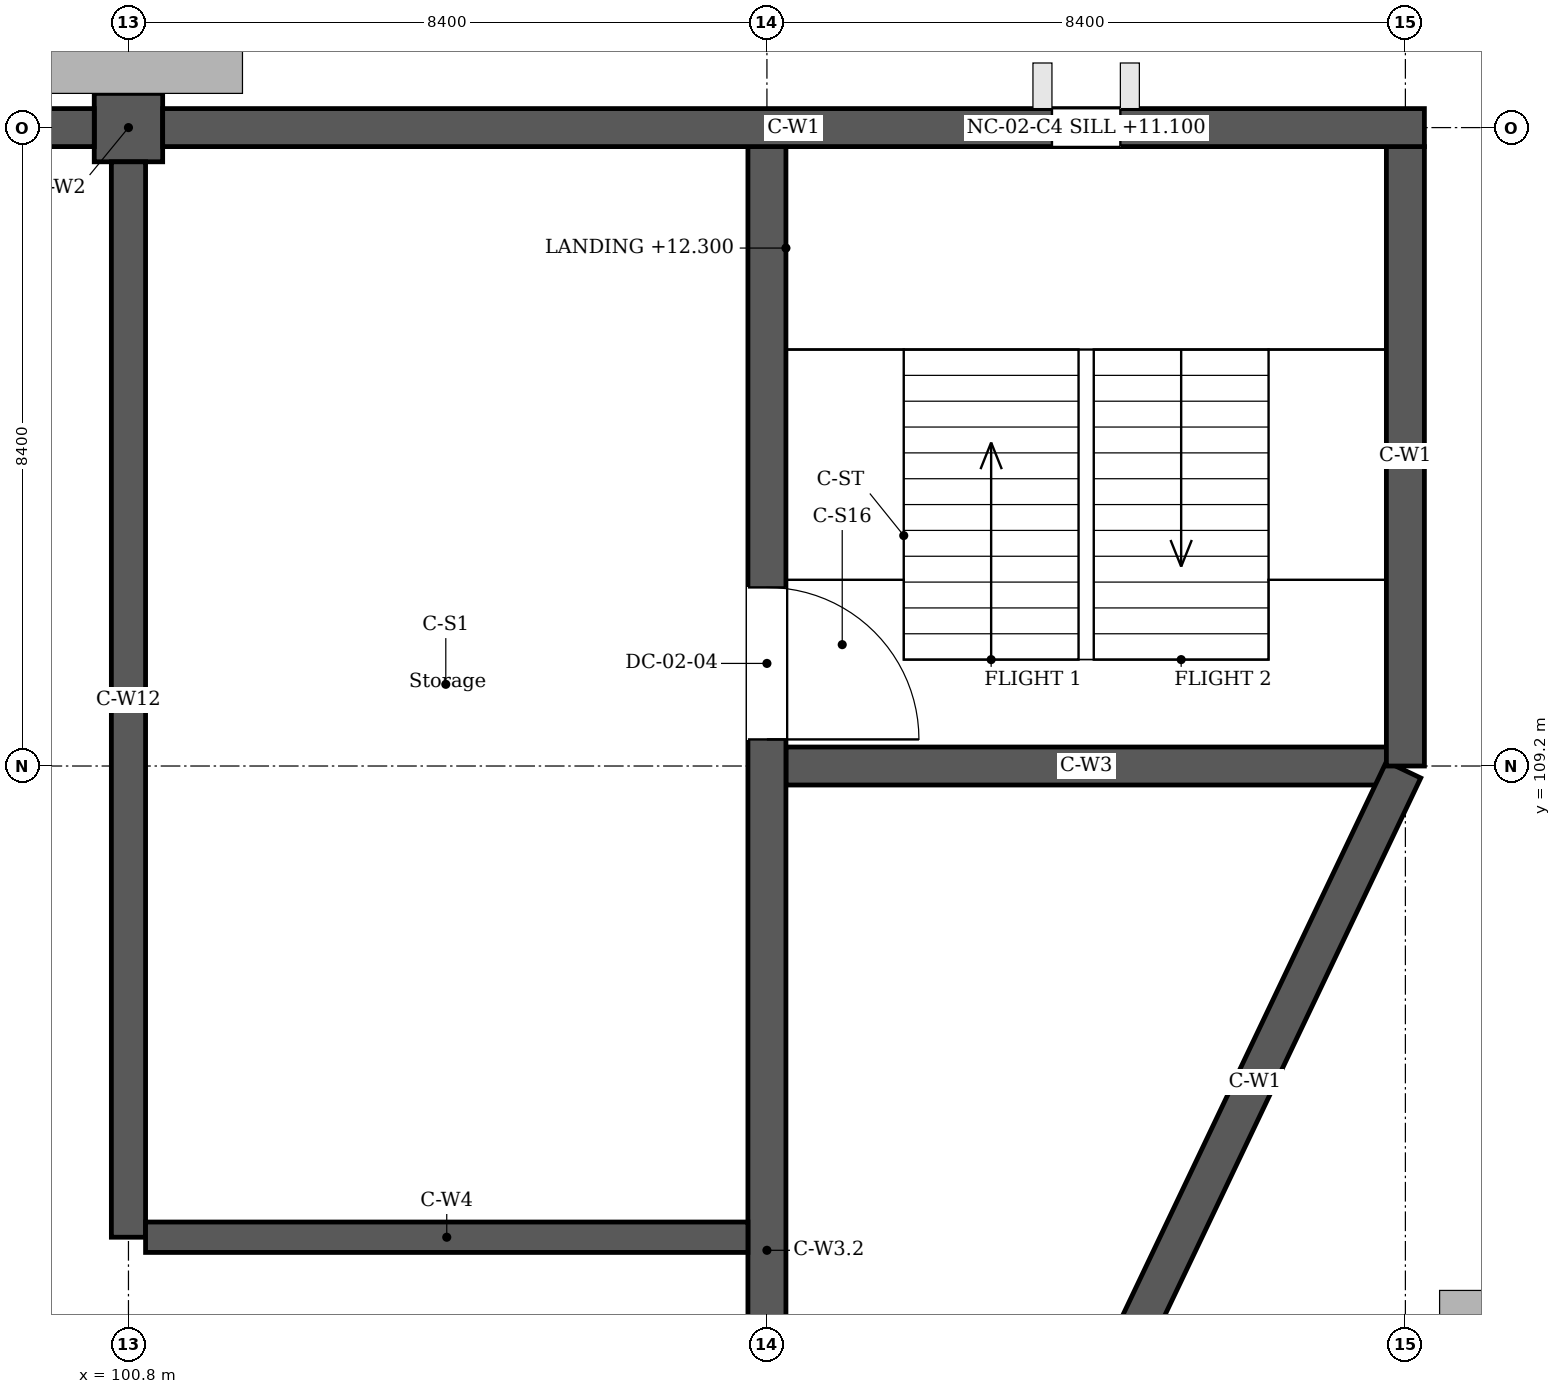
"""IFC4 building model, lengths in metres.
Left out: names, types, materials, properties, quantities, classifications, styles, units other than length and angle.
Written with IfcOpenShell. Run it as: python <this file> out.ifc"""

import sys

from ifc_helpers import new_model, si_unit, direction, frame, frame_2d, origin, place, context, subcontext, project, spatial, rectangle, extrude, element, fill, save


model = new_model("IFC4")
c1 = context("Model", 3, precision=1e-05, world=origin(), true_north=direction((0.0, 1.0)))
c2 = subcontext(c1, "Body", "Model", "MODEL_VIEW")
j1 = project(units=[si_unit("LENGTHUNIT", "METRE"), si_unit("PLANEANGLEUNIT", "RADIAN")], contexts=[c1])
p1 = place(None, origin())
s1 = spatial("IfcSite", under=j1, at=p1, CompositionType="ELEMENT")
p2 = place(p1, origin())
s2 = spatial("IfcBuilding", under=s1, at=p2, CompositionType="ELEMENT")
p3 = place(p2, frame((0.0, 0.0, 10.2)))
s3 = spatial("IfcBuildingStorey", under=s2, at=p3, CompositionType="ELEMENT", Elevation=10.2)
p4 = place(p3, frame((117.576, 109.15, 0.0), z_axis=(0.0, 0.0, 1.0), x_axis=(-0.429931496654, -0.902861511077, 0.0)))
e1 = element("IfcWall", 1, at=p4, inside=s3, PredefinedType="SOLIDWALL", context=c2, shape_type="SweptSolid", body=[
    extrude(rectangle(XDim=9.096, YDim=0.5, at=frame_2d((4.548, 0.0))), origin(), (0.0, 0.0, 1.0), 4.2),
])
p5 = place(p3, frame((117.6, 117.35, 0.0), z_axis=(0.0, 0.0, 1.0), x_axis=(0.0, -1.0, 0.0)))
e2 = element("IfcWall", 2, at=p5, inside=s3, PredefinedType="SOLIDWALL", context=c2, shape_type="SweptSolid", body=[
    extrude(rectangle(XDim=8.15, YDim=0.5, at=frame_2d((4.075, 0.0))), origin(), (0.0, 0.0, 1.0), 4.2),
])
p6 = place(p3, frame((101.25, 117.6, 0.0), z_axis=(0.0, 0.0, 1.0), x_axis=(1.0, 0.0, 0.0)))
e3 = element("IfcWall", 3, at=p6, inside=s3, PredefinedType="SOLIDWALL", context=c2, shape_type="SweptSolid", body=[
    extrude(rectangle(XDim=16.6, YDim=0.5, at=frame_2d((8.3, 0.0))), origin(), (0.0, 0.0, 1.0), 4.2),
])
p7 = place(p6, frame((11.7, 0.0, 0.9)))
e4 = element("IfcOpeningElement", 4, at=p7, cuts=e3, PredefinedType="OPENING", context=c2, shape_type="SweptSolid", body=[
    extrude(rectangle(XDim=0.9, YDim=2.4, at=frame_2d((0.45, 1.2))), frame((0.0, 0.26, 0.0), z_axis=(0.0, -1.0, 0.0), x_axis=(1.0, 0.0, 0.0)), (0.0, 0.0, 1.0), 0.52),
])
p8 = place(p3, frame((92.85, 117.6, 0.0), z_axis=(0.0, 0.0, 1.0), x_axis=(1.0, 0.0, 0.0)))
e5 = element("IfcWall", 5, at=p8, inside=s3, PredefinedType="SOLIDWALL", context=c2, shape_type="SweptSolid", body=[
    extrude(rectangle(XDim=7.5, YDim=0.5, at=frame_2d((3.75, 0.0))), origin(), (0.0, 0.0, 1.0), 4.2),
])
p9 = place(p3, frame((101.25, 117.6, 0.0), z_axis=(0.0, 0.0, 1.0), x_axis=(-1.0, 0.0, 0.0)))
e6 = element("IfcWall", 6, at=p9, inside=s3, PredefinedType="SOLIDWALL", context=c2, shape_type="SweptSolid", body=[
    extrude(rectangle(XDim=0.9, YDim=0.9, at=frame_2d((0.45, 0.0))), origin(), (0.0, 0.0, 1.0), 4.2),
])
p10 = place(p3, frame((109.2, 117.35, 0.0), z_axis=(0.0, 0.0, 1.0), x_axis=(0.0, -1.0, 0.0)))
e7 = element("IfcWall", 7, at=p10, inside=s3, PredefinedType="SOLIDWALL", context=c2, shape_type="SweptSolid", body=[
    extrude(rectangle(XDim=41.5, YDim=0.5, at=frame_2d((20.75, 0.0))), origin(), (0.0, 0.0, 1.0), 4.2),
])
p11 = place(p10, frame((5.8, 0.0, 0.0)))
e8 = element("IfcOpeningElement", 8, at=p11, cuts=e7, PredefinedType="OPENING", context=c2, shape_type="SweptSolid", body=[
    extrude(rectangle(XDim=2.0, YDim=2.1, at=frame_2d((1.0, 1.05))), frame((0.0, 0.26, 0.0), z_axis=(0.0, -1.0, 0.0), x_axis=(1.0, 0.0, 0.0)), (0.0, 0.0, 1.0), 0.52),
])
p12 = place(p3, frame((100.8, 103.0, 0.0), z_axis=(0.0, 0.0, 1.0), x_axis=(0.0, 1.0, 0.0)))
e9 = element("IfcWall", 9, at=p12, inside=s3, PredefinedType="SOLIDWALL", context=c2, shape_type="SweptSolid", body=[
    extrude(rectangle(XDim=14.15, YDim=0.45, at=frame_2d((7.075, 0.0))), origin(), (0.0, 0.0, 1.0), 4.2),
])
p13 = place(p3, frame((101.025, 103.0, 0.0), z_axis=(0.0, 0.0, 1.0), x_axis=(1.0, 0.0, 0.0)))
e10 = element("IfcWall", 10, at=p13, inside=s3, PredefinedType="SOLIDWALL", context=c2, shape_type="SweptSolid", body=[
    extrude(rectangle(XDim=7.925, YDim=0.4, at=frame_2d((3.962, 0.0))), origin(), (0.0, 0.0, 1.0), 4.2),
])
p14 = place(p3, frame((109.45, 109.2, 0.0), z_axis=(0.0, 0.0, 1.0), x_axis=(1.0, 0.0, 0.0)))
e11 = element("IfcWall", 11, at=p14, inside=s3, PredefinedType="SOLIDWALL", context=c2, shape_type="SweptSolid", body=[
    extrude(rectangle(XDim=7.9, YDim=0.5, at=frame_2d((3.95, 0.0))), origin(), (0.0, 0.0, 1.0), 4.2),
])
p15 = place(p7, origin())
e12 = element("IfcWindow", 12, at=p15, inside=s3, PartitioningType="SINGLE_PANEL", PredefinedType="WINDOW", context=c2, shape_type="SweptSolid", body=[
    extrude(rectangle(XDim=0.9, YDim=2.4, at=frame_2d((0.45, 1.2))), frame((0.0, 0.03, 0.0), z_axis=(0.0, -1.0, 0.0), x_axis=(1.0, 0.0, 0.0)), (0.0, 0.0, 1.0), 0.06),
])
fill(e4, e12)
p16 = place(p11, origin())
e13 = element("IfcDoor", 13, at=p16, inside=s3, OperationType="DOUBLE_DOOR_DOUBLE_SWING", PredefinedType="DOOR", context=c2, shape_type="SweptSolid", body=[
    extrude(rectangle(XDim=2.0, YDim=2.1, at=frame_2d((1.0, 1.05))), frame((0.0, 0.025, 0.0), z_axis=(0.0, -1.0, 0.0), x_axis=(1.0, 0.0, 0.0)), (0.0, 0.0, 1.0), 0.05),
])
fill(e8, e13)
save(model, sys.argv[1])
